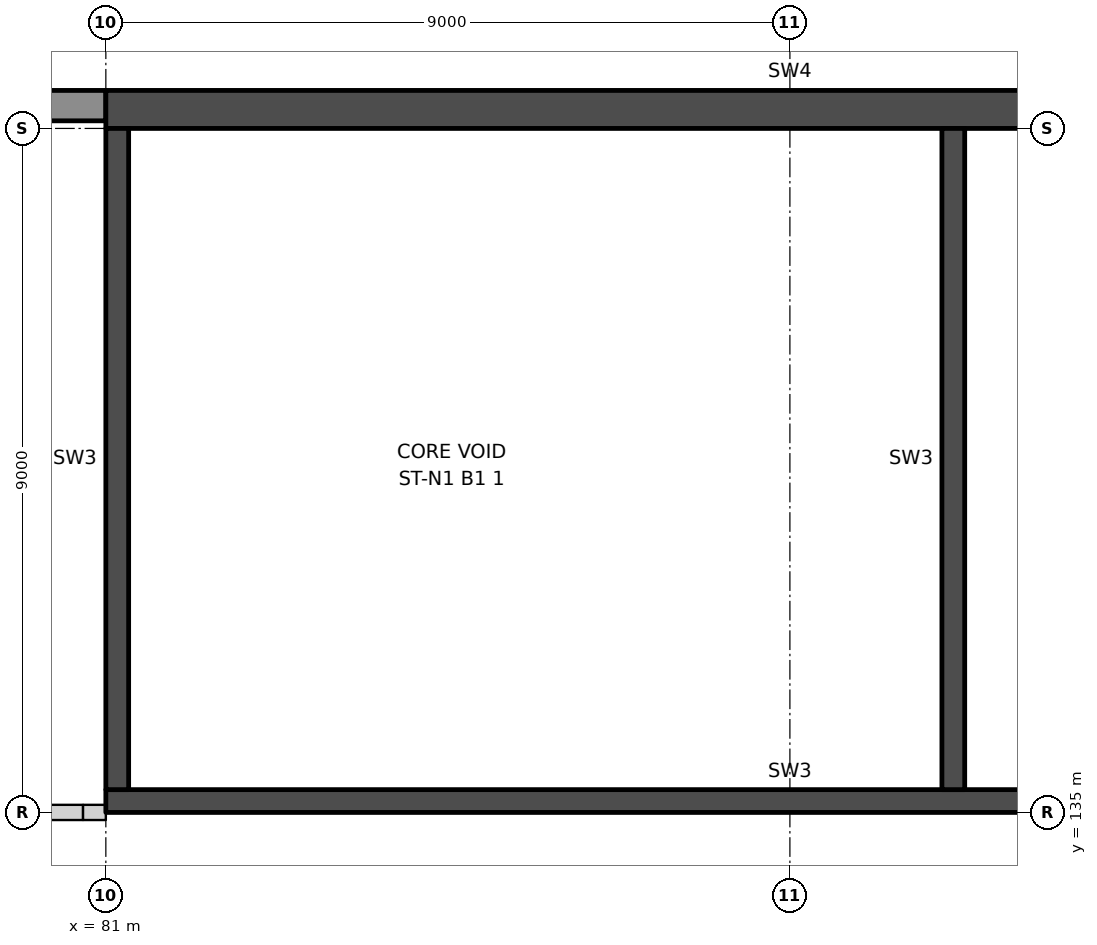
"""IFC4 building model, lengths in metres.
Left out: names, types, materials, properties, quantities, classifications, styles, units other than length and angle.
Written with IfcOpenShell. Run it as: python <this file> out.ifc"""

import sys

from ifc_helpers import new_model, si_unit, direction, frame, frame_2d, origin, place, context, subcontext, project, spatial, rectangle, extrude, element, save


model = new_model("IFC4")
c1 = context("Model", 3, precision=1e-05, world=origin(), true_north=direction((0.0, 1.0)))
c2 = subcontext(c1, "Body", "Model", "MODEL_VIEW")
j1 = project(units=[si_unit("LENGTHUNIT", "METRE"), si_unit("PLANEANGLEUNIT", "RADIAN")], contexts=[c1])
p1 = place(None, origin())
s1 = spatial("IfcSite", under=j1, at=p1, CompositionType="ELEMENT")
p2 = place(p1, origin())
s2 = spatial("IfcBuilding", under=s1, at=p2, CompositionType="ELEMENT")
p3 = place(p2, frame((0.0, 0.0, -6.0)))
s3 = spatial("IfcBuildingStorey", under=s2, at=p3, CompositionType="ELEMENT", Elevation=-6.0)
p4 = place(p3, frame((72.0, 135.0, 0.0), z_axis=(0.0, 0.0, 1.0), x_axis=(1.0, 0.0, 0.0)))
e1 = element("IfcWall", 1, at=p4, inside=s3, PredefinedType="PARTITIONING", context=c2, shape_type="SweptSolid", body=[
    extrude(rectangle(XDim=8.7, YDim=0.2, at=frame_2d((4.35, 0.0))), origin(), (0.0, 0.0, 1.0), 4.55),
])
p5 = place(p4, frame((3.6, 0.0, 0.0)))
e2 = element("IfcOpeningElement", 2, at=p5, cuts=e1, PredefinedType="OPENING", context=c2, shape_type="SweptSolid", body=[
    extrude(rectangle(XDim=1.8, YDim=2.1, at=frame_2d((0.9, 1.05))), frame((0.0, 0.11, 0.0), z_axis=(0.0, -1.0, 0.0), x_axis=(1.0, 0.0, 0.0)), (0.0, 0.0, 1.0), 0.22),
])
p6 = place(p3, frame((81.0, 144.3, 0.0), z_axis=(0.0, 0.0, 1.0), x_axis=(-1.0, 0.0, 0.0)))
e3 = element("IfcWall", 3, at=p6, inside=s3, PredefinedType="SOLIDWALL", context=c2, shape_type="SweptSolid", body=[
    extrude(rectangle(XDim=9.0, YDim=0.4, at=frame_2d((4.5, 0.0))), origin(), (0.0, 0.0, 1.0), 6.0),
])
p7 = place(p3, frame((81.0, 135.15, 0.0), z_axis=(0.0, 0.0, 1.0), x_axis=(1.0, 0.0, 0.0)))
e4 = element("IfcWall", 4, at=p7, inside=s3, PredefinedType="SHEAR", context=c2, shape_type="SweptSolid", body=[
    extrude(rectangle(XDim=18.0, YDim=0.3, at=frame_2d((9.0, 0.0))), origin(), (0.0, 0.0, 1.0), 6.0),
])
p8 = place(p3, frame((81.0, 144.25, 0.0), z_axis=(0.0, 0.0, 1.0), x_axis=(1.0, 0.0, 0.0)))
e5 = element("IfcWall", 5, at=p8, inside=s3, PredefinedType="SHEAR", context=c2, shape_type="SweptSolid", body=[
    extrude(rectangle(XDim=18.0, YDim=0.5, at=frame_2d((9.0, 0.0))), origin(), (0.0, 0.0, 1.0), 6.0),
])
for number, where, z_axis, x_axis in (
    (6, (81.15, 135.3, 0.0), (0.0, 0.0, 1.0), (0.0, 1.0, 0.0)),
    (7, (92.15, 135.3, 0.0), (0.0, 0.0, 1.0), (0.0, 1.0, 0.0)),
):
    element("IfcWall", number, at=place(p3, frame(where, z_axis=z_axis, x_axis=x_axis)), inside=s3, PredefinedType="SHEAR", context=c2, shape_type="SweptSolid", body=[
        extrude(rectangle(XDim=8.7, YDim=0.3, at=frame_2d((4.35, 0.0))), origin(), (0.0, 0.0, 1.0), 6.0),
    ])
p9 = place(p3, frame((80.7, 135.0, 0.0), z_axis=(0.0, 0.0, 1.0), x_axis=(1.0, 0.0, 0.0)))
e8 = element("IfcWall", 8, at=p9, inside=s3, PredefinedType="PARTITIONING", context=c2, shape_type="SweptSolid", body=[
    extrude(rectangle(XDim=0.3, YDim=0.2, at=frame_2d((0.15, 0.0))), origin(), (0.0, 0.0, 1.0), 6.0),
])
save(model, sys.argv[1])
